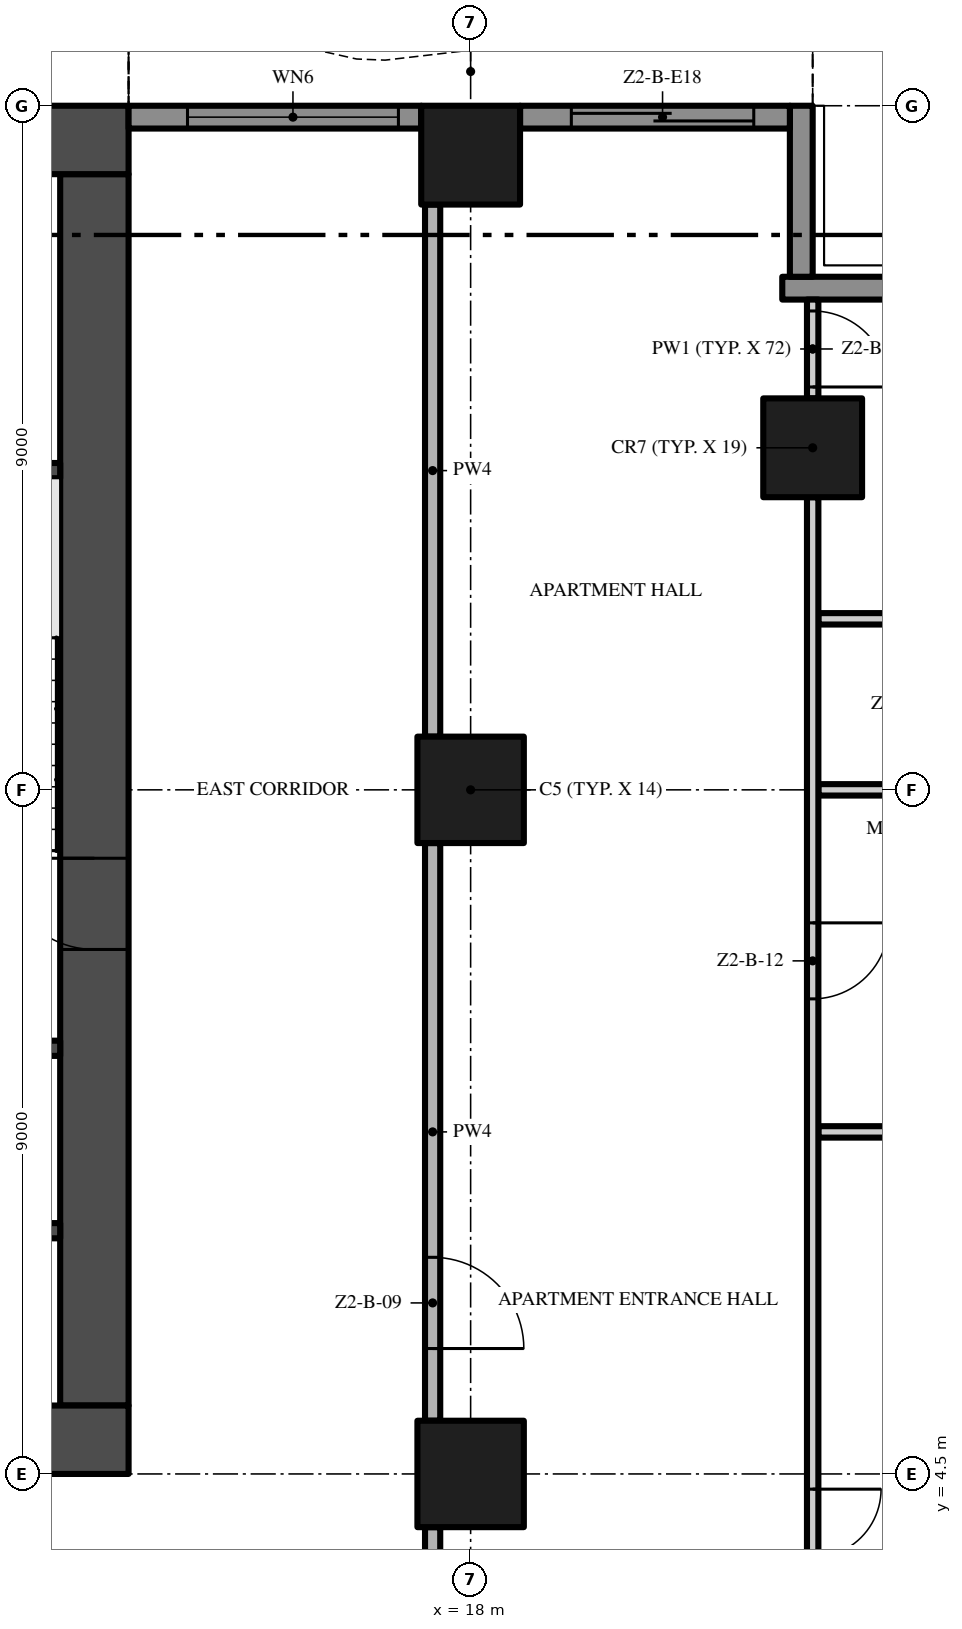
"""IFC4 building model, lengths in metres.
Left out: names, types, materials, properties, quantities, classifications, styles, units other than length and angle.
Written with IfcOpenShell. Run it as: python <this file> out.ifc"""

import sys

from ifc_helpers import new_model, si_unit, direction, frame, frame_2d, origin, origin_2d, place, context, subcontext, project, spatial, polyline, rectangle, outline, extrude, element, fill, save


model = new_model("IFC4")
c1 = context("Model", 3, precision=1e-05, world=origin(), true_north=direction((0.0, 1.0)))
c2 = subcontext(c1, "Body", "Model", "MODEL_VIEW")
j1 = project(units=[si_unit("LENGTHUNIT", "METRE"), si_unit("PLANEANGLEUNIT", "RADIAN")], contexts=[c1])
p1 = place(None, origin())
s1 = spatial("IfcSite", under=j1, at=p1, CompositionType="ELEMENT")
p2 = place(p1, origin())
s2 = spatial("IfcBuilding", under=s1, at=p2, CompositionType="ELEMENT")
p3 = place(p2, frame((0.0, 0.0, 88.4)))
s3 = spatial("IfcBuildingStorey", under=s2, at=p3, CompositionType="ELEMENT", Elevation=88.4)
p4 = place(p3, frame((-13.5, 4.95, -0.3), z_axis=(0.0, 0.0, 1.0), x_axis=(1.0, 0.0, 0.0)))
e1 = element("IfcWall", 1, at=p4, inside=s3, PredefinedType="SHEAR", context=c2, shape_type="SweptSolid", body=[
    extrude(rectangle(XDim=27.0, YDim=0.9, at=frame_2d((13.5, 0.0))), origin(), (0.0, 0.0, 1.0), 3.8),
])
p5 = place(p4, frame((12.0, 0.0, 0.3)))
e2 = element("IfcOpeningElement", 2, at=p5, cuts=e1, PredefinedType="OPENING", context=c2, shape_type="SweptSolid", body=[
    extrude(rectangle(XDim=3.0, YDim=2.4, at=frame_2d((1.5, 1.2))), frame((0.0, 0.46, 0.0), z_axis=(0.0, -1.0, 0.0), x_axis=(1.0, 0.0, 0.0)), (0.0, 0.0, 1.0), 0.92),
])
p6 = place(p4, frame((4.9, 0.0, 0.3)))
e3 = element("IfcOpeningElement", 3, at=p6, cuts=e1, PredefinedType="OPENING", context=c2, shape_type="SweptSolid", body=[
    extrude(rectangle(XDim=1.2, YDim=2.2, at=frame_2d((0.6, 1.1))), frame((0.0, 0.46, 0.0), z_axis=(0.0, -1.0, 0.0), x_axis=(1.0, 0.0, 0.0)), (0.0, 0.0, 1.0), 0.92),
])
p7 = place(p4, frame((20.75, 0.0, 0.3)))
e4 = element("IfcOpeningElement", 4, at=p7, cuts=e1, PredefinedType="OPENING", context=c2, shape_type="SweptSolid", body=[
    extrude(rectangle(XDim=1.5, YDim=2.2, at=frame_2d((0.75, 1.1))), frame((0.0, 0.46, 0.0), z_axis=(0.0, -1.0, 0.0), x_axis=(1.0, 0.0, 0.0)), (0.0, 0.0, 1.0), 0.92),
])
p8 = place(p4, frame((17.4, 0.0, 0.3)))
e5 = element("IfcOpeningElement", 5, at=p8, cuts=e1, PredefinedType="OPENING", context=c2, shape_type="SweptSolid", body=[
    extrude(rectangle(XDim=1.2, YDim=2.2, at=frame_2d((0.6, 1.1))), frame((0.0, 0.46, 0.0), z_axis=(0.0, -1.0, 0.0), x_axis=(1.0, 0.0, 0.0)), (0.0, 0.0, 1.0), 0.92),
])
p9 = place(p3, frame((13.05, 5.4, -0.3), z_axis=(0.0, 0.0, 1.0), x_axis=(0.0, 1.0, 0.0)))
e6 = element("IfcWall", 6, at=p9, inside=s3, PredefinedType="SHEAR", context=c2, shape_type="SweptSolid", body=[
    extrude(rectangle(XDim=16.2, YDim=0.9, at=frame_2d((8.1, 0.0))), origin(), (0.0, 0.0, 1.0), 3.8),
])
p10 = place(p9, frame((6.0, 0.0, 0.3)))
e7 = element("IfcOpeningElement", 7, at=p10, cuts=e6, PredefinedType="OPENING", context=c2, shape_type="SweptSolid", body=[
    extrude(rectangle(XDim=1.2, YDim=2.2, at=frame_2d((0.6, 1.1))), frame((0.0, 0.46, 0.0), z_axis=(0.0, -1.0, 0.0), x_axis=(1.0, 0.0, 0.0)), (0.0, 0.0, 1.0), 0.92),
])
p11 = place(p3, frame((13.5, 22.05, -0.3), z_axis=(0.0, 0.0, 1.0), x_axis=(-1.0, 0.0, 0.0)))
e8 = element("IfcWall", 8, at=p11, inside=s3, PredefinedType="SHEAR", context=c2, shape_type="SweptSolid", body=[
    extrude(rectangle(XDim=27.0, YDim=0.9, at=frame_2d((13.5, 0.0))), origin(), (0.0, 0.0, 1.0), 3.8),
])
p12 = place(p3, frame((18.0, 13.5, 0.0), z_axis=(0.0, 0.0, 1.0), x_axis=(1.0, 0.0, 0.0)))
e9 = element("IfcColumn", 9, at=p12, inside=s3, PredefinedType="COLUMN", context=c2, shape_type="SweptSolid", body=[
    extrude(rectangle(XDim=1.4, YDim=1.4, at=origin_2d()), origin(), (0.0, 0.0, 1.0), 3.5),
])
p13 = place(p3, frame((18.0, 21.85, 0.0), z_axis=(0.0, 0.0, 1.0), x_axis=(1.0, 0.0, 0.0)))
e10 = element("IfcColumn", 10, at=p13, inside=s3, PredefinedType="COLUMN", context=c2, shape_type="SweptSolid", body=[
    extrude(rectangle(XDim=1.3, YDim=1.3, at=origin_2d()), origin(), (0.0, 0.0, 1.0), 3.5),
])
p14 = place(p3, frame((18.0, 4.5, 0.0), z_axis=(0.0, 0.0, 1.0), x_axis=(1.0, 0.0, 0.0)))
e11 = element("IfcColumn", 11, at=p14, inside=s3, PredefinedType="COLUMN", context=c2, shape_type="SweptSolid", body=[
    extrude(rectangle(XDim=1.4, YDim=1.4, at=origin_2d()), origin(), (0.0, 0.0, 1.0), 3.5),
])
p15 = place(p3, frame((22.5, 18.0, 0.0), z_axis=(0.0, 0.0, 1.0), x_axis=(1.0, 0.0, 0.0)))
e12 = element("IfcColumn", 12, at=p15, inside=s3, PredefinedType="COLUMN", context=c2, shape_type="SweptSolid", body=[
    extrude(rectangle(XDim=1.3, YDim=1.3, at=origin_2d()), origin(), (0.0, 0.0, 1.0), 3.5),
])
p16 = place(p3, frame((22.1, 20.1, 0.0), z_axis=(0.0, 0.0, 1.0), x_axis=(1.0, 0.0, 0.0)))
e13 = element("IfcWall", 13, at=p16, inside=s3, PredefinedType="SOLIDWALL", context=c2, shape_type="SweptSolid", body=[
    extrude(rectangle(XDim=2.35, YDim=0.3, at=frame_2d((1.175, 0.0))), origin(), (0.0, 0.0, 1.0), 3.5),
])
p17 = place(p3, frame((22.35, 22.5, 0.0), z_axis=(0.0, 0.0, 1.0), x_axis=(0.0, -1.0, 0.0)))
e14 = element("IfcWall", 14, at=p17, inside=s3, PredefinedType="SOLIDWALL", context=c2, shape_type="SweptSolid", body=[
    extrude(rectangle(XDim=2.25, YDim=0.3, at=frame_2d((1.125, 0.0))), origin(), (0.0, 0.0, 1.0), 3.5),
])
p18 = place(p3, frame((18.65, 22.35, 0.0), z_axis=(0.0, 0.0, 1.0), x_axis=(1.0, 0.0, 0.0)))
e15 = element("IfcWall", 15, at=p18, inside=s3, PredefinedType="SOLIDWALL", context=c2, shape_type="SweptSolid", body=[
    extrude(rectangle(XDim=3.55, YDim=0.3, at=frame_2d((1.775, 0.0))), origin(), (0.0, 0.0, 1.0), 3.5),
])
p19 = place(p18, frame((0.675, 0.0, 0.0)))
e16 = element("IfcOpeningElement", 16, at=p19, cuts=e15, PredefinedType="OPENING", context=c2, shape_type="SweptSolid", body=[
    extrude(rectangle(XDim=2.4, YDim=2.4, at=frame_2d((1.2, 1.2))), frame((0.0, 0.16, 0.0), z_axis=(0.0, -1.0, 0.0), x_axis=(1.0, 0.0, 0.0)), (0.0, 0.0, 1.0), 0.32),
])
p20 = place(p3, frame((13.5, 22.35, 0.0), z_axis=(0.0, 0.0, 1.0), x_axis=(1.0, 0.0, 0.0)))
e17 = element("IfcWall", 17, at=p20, inside=s3, PredefinedType="SOLIDWALL", context=c2, shape_type="SweptSolid", body=[
    extrude(rectangle(XDim=3.85, YDim=0.3, at=frame_2d((1.925, 0.0))), origin(), (0.0, 0.0, 1.0), 3.5),
])
p21 = place(p20, frame((0.775, 0.0, 0.45)))
e18 = element("IfcOpeningElement", 18, at=p21, cuts=e17, PredefinedType="OPENING", context=c2, shape_type="SweptSolid", body=[
    extrude(rectangle(XDim=2.775, YDim=2.65, at=frame_2d((1.387, 1.325))), frame((0.0, 0.16, 0.0), z_axis=(0.0, -1.0, 0.0), x_axis=(1.0, 0.0, 0.0)), (0.0, 0.0, 1.0), 0.32),
])
p22 = place(p3, origin())
e19 = element("IfcWall", 19, at=p22, inside=s3, PredefinedType="USERDEFINED", context=c2, shape_type="SweptSolid", body=[
    extrude(outline(polyline([(22.5, 25.149), (21.0, 24.488), (19.5, 23.755), (18.0, 23.231), (16.875, 23.1), (16.5, 23.115), (15.0, 23.451), (13.5, 24.112), (13.399, 23.883), (14.921, 23.213), (16.467, 22.866), (16.885, 22.849), (18.056, 22.986), (19.596, 23.524), (21.105, 24.261), (22.601, 24.92), (22.5, 25.149)])), origin(), (0.0, 0.0, 1.0), 0.9),
])
for number, where, z_axis, x_axis in (
    (20, (9.65, 7.7, 0.0), (0.0, 0.0, 1.0), (1.0, 0.0, 0.0)),
    (21, (9.65, 10.1, 0.0), (0.0, 0.0, 1.0), (1.0, 0.0, 0.0)),
    (22, (9.65, 17.7, 0.0), (0.0, 0.0, 1.0), (1.0, 0.0, 0.0)),
):
    element("IfcWall", number, at=place(p3, frame(where, z_axis=z_axis, x_axis=x_axis)), inside=s3, PredefinedType="SHEAR", context=c2, shape_type="SweptSolid", body=[
        extrude(rectangle(XDim=2.95, YDim=0.2, at=frame_2d((1.475, 0.0))), origin(), (0.0, 0.0, 1.0), 3.5),
    ])
p23 = place(p3, frame((22.575, 9.0, 0.0), z_axis=(0.0, 0.0, 1.0), x_axis=(1.0, 0.0, 0.0)))
e23 = element("IfcWall", 23, at=p23, inside=s3, PredefinedType="PARTITIONING", context=c2, shape_type="SweptSolid", body=[
    extrude(rectangle(XDim=4.125, YDim=0.15, at=frame_2d((2.062, 0.0))), origin(), (0.0, 0.0, 1.0), 3.5),
])
p24 = place(p3, frame((22.575, 13.5, 0.0), z_axis=(0.0, 0.0, 1.0), x_axis=(1.0, 0.0, 0.0)))
e24 = element("IfcWall", 24, at=p24, inside=s3, PredefinedType="PARTITIONING", context=c2, shape_type="SweptSolid", body=[
    extrude(rectangle(XDim=3.125, YDim=0.15, at=frame_2d((1.562, 0.0))), origin(), (0.0, 0.0, 1.0), 3.5),
])
p25 = place(p3, frame((22.575, 15.75, 0.0), z_axis=(0.0, 0.0, 1.0), x_axis=(1.0, 0.0, 0.0)))
e25 = element("IfcWall", 25, at=p25, inside=s3, PredefinedType="PARTITIONING", context=c2, shape_type="SweptSolid", body=[
    extrude(rectangle(XDim=1.875, YDim=0.15, at=frame_2d((0.938, 0.0))), origin(), (0.0, 0.0, 1.0), 3.5),
])
p26 = place(p3, frame((17.5, -0.2, 0.0), z_axis=(0.0, 0.0, 1.0), x_axis=(0.0, 1.0, 0.0)))
e26 = element("IfcWall", 26, at=p26, inside=s3, PredefinedType="PARTITIONING", context=c2, shape_type="SweptSolid", body=[
    extrude(rectangle(XDim=4.0, YDim=0.2, at=frame_2d((2.0, 0.0))), origin(), (0.0, 0.0, 1.0), 3.5),
])
p27 = place(p3, frame((17.5, 12.8, 0.0), z_axis=(0.0, 0.0, 1.0), x_axis=(0.0, -1.0, 0.0)))
e27 = element("IfcWall", 27, at=p27, inside=s3, PredefinedType="PARTITIONING", context=c2, shape_type="SweptSolid", body=[
    extrude(rectangle(XDim=7.6, YDim=0.2, at=frame_2d((3.8, 0.0))), origin(), (0.0, 0.0, 1.0), 3.5),
])
p28 = place(p27, frame((5.45, 0.0, 0.0)))
e28 = element("IfcOpeningElement", 28, at=p28, cuts=e27, PredefinedType="OPENING", context=c2, shape_type="SweptSolid", body=[
    extrude(rectangle(XDim=1.2, YDim=2.4, at=frame_2d((0.6, 1.2))), frame((0.0, 0.11, 0.0), z_axis=(0.0, -1.0, 0.0), x_axis=(1.0, 0.0, 0.0)), (0.0, 0.0, 1.0), 0.22),
])
p29 = place(p3, frame((17.5, 14.2, 0.0), z_axis=(0.0, 0.0, 1.0), x_axis=(0.0, 1.0, 0.0)))
e29 = element("IfcWall", 29, at=p29, inside=s3, PredefinedType="PARTITIONING", context=c2, shape_type="SweptSolid", body=[
    extrude(rectangle(XDim=7.0, YDim=0.2, at=frame_2d((3.5, 0.0))), origin(), (0.0, 0.0, 1.0), 3.5),
])
p30 = place(p3, frame((22.5, 17.35, 0.0), z_axis=(0.0, 0.0, 1.0), x_axis=(0.0, -1.0, 0.0)))
e30 = element("IfcWall", 30, at=p30, inside=s3, PredefinedType="PARTITIONING", context=c2, shape_type="SweptSolid", body=[
    extrude(rectangle(XDim=17.25, YDim=0.15, at=frame_2d((8.625, 0.0))), origin(), (0.0, 0.0, 1.0), 3.5),
])
p31 = place(p30, frame((13.05, 0.0, 0.0)))
e31 = element("IfcOpeningElement", 31, at=p31, cuts=e30, PredefinedType="OPENING", context=c2, shape_type="SweptSolid", body=[
    extrude(rectangle(XDim=1.8, YDim=2.4, at=frame_2d((0.9, 1.2))), frame((0.0, 0.085, 0.0), z_axis=(0.0, -1.0, 0.0), x_axis=(1.0, 0.0, 0.0)), (0.0, 0.0, 1.0), 0.17),
])
p32 = place(p30, frame((5.6, 0.0, 0.0)))
e32 = element("IfcOpeningElement", 32, at=p32, cuts=e30, PredefinedType="OPENING", context=c2, shape_type="SweptSolid", body=[
    extrude(rectangle(XDim=1.0, YDim=2.4, at=frame_2d((0.5, 1.2))), frame((0.0, 0.085, 0.0), z_axis=(0.0, -1.0, 0.0), x_axis=(1.0, 0.0, 0.0)), (0.0, 0.0, 1.0), 0.17),
])
p33 = place(p3, frame((22.5, 19.95, 0.0), z_axis=(0.0, 0.0, 1.0), x_axis=(0.0, -1.0, 0.0)))
e33 = element("IfcWall", 33, at=p33, inside=s3, PredefinedType="PARTITIONING", context=c2, shape_type="SweptSolid", body=[
    extrude(rectangle(XDim=1.3, YDim=0.15, at=frame_2d((0.65, 0.0))), origin(), (0.0, 0.0, 1.0), 3.5),
])
p34 = place(p33, frame((0.15, 0.0, 0.0)))
e34 = element("IfcOpeningElement", 34, at=p34, cuts=e33, PredefinedType="OPENING", context=c2, shape_type="SweptSolid", body=[
    extrude(rectangle(XDim=1.0, YDim=2.4, at=frame_2d((0.5, 1.2))), frame((0.0, 0.085, 0.0), z_axis=(0.0, -1.0, 0.0), x_axis=(1.0, 0.0, 0.0)), (0.0, 0.0, 1.0), 0.17),
])
p35 = place(p19, origin())
e35 = element("IfcDoor", 35, at=p35, inside=s3, OperationType="SINGLE_SWING_LEFT", PredefinedType="DOOR", context=c2, shape_type="SweptSolid", body=[
    extrude(rectangle(XDim=2.4, YDim=2.4, at=frame_2d((1.2, 1.2))), frame((0.0, 0.025, 0.0), z_axis=(0.0, -1.0, 0.0), x_axis=(1.0, 0.0, 0.0)), (0.0, 0.0, 1.0), 0.05),
])
fill(e16, e35)
p36 = place(p21, origin())
e36 = element("IfcWindow", 36, at=p36, inside=s3, PartitioningType="SINGLE_PANEL", PredefinedType="WINDOW", context=c2, shape_type="SweptSolid", body=[
    extrude(rectangle(XDim=2.775, YDim=2.65, at=frame_2d((1.387, 1.325))), frame((0.0, 0.03, 0.0), z_axis=(0.0, -1.0, 0.0), x_axis=(1.0, 0.0, 0.0)), (0.0, 0.0, 1.0), 0.06),
])
fill(e18, e36)
p37 = place(p10, frame((1.2, 0.0, 0.0), z_axis=(0.0, 0.0, 1.0), x_axis=(-1.0, 0.0, 0.0)))
e37 = element("IfcDoor", 37, at=p37, inside=s3, OperationType="SINGLE_SWING_LEFT", PredefinedType="DOOR", context=c2, shape_type="SweptSolid", body=[
    extrude(rectangle(XDim=1.2, YDim=2.2, at=frame_2d((0.6, 1.1))), frame((0.0, 0.025, 0.0), z_axis=(0.0, -1.0, 0.0), x_axis=(1.0, 0.0, 0.0)), (0.0, 0.0, 1.0), 0.05),
])
fill(e7, e37)
p38 = place(p28, origin())
e38 = element("IfcDoor", 38, at=p38, inside=s3, OperationType="SINGLE_SWING_RIGHT", PredefinedType="DOOR", context=c2, shape_type="SweptSolid", body=[
    extrude(rectangle(XDim=1.2, YDim=2.4, at=frame_2d((0.6, 1.2))), frame((0.0, 0.025, 0.0), z_axis=(0.0, -1.0, 0.0), x_axis=(1.0, 0.0, 0.0)), (0.0, 0.0, 1.0), 0.05),
])
fill(e28, e38)
p39 = place(p31, origin())
e39 = element("IfcDoor", 39, at=p39, inside=s3, OperationType="DOUBLE_DOOR_SINGLE_SWING", PredefinedType="DOOR", context=c2, shape_type="SweptSolid", body=[
    extrude(rectangle(XDim=1.8, YDim=2.4, at=frame_2d((0.9, 1.2))), frame((0.0, 0.025, 0.0), z_axis=(0.0, -1.0, 0.0), x_axis=(1.0, 0.0, 0.0)), (0.0, 0.0, 1.0), 0.05),
])
fill(e31, e39)
p40 = place(p32, origin())
e40 = element("IfcDoor", 40, at=p40, inside=s3, OperationType="SINGLE_SWING_LEFT", PredefinedType="DOOR", context=c2, shape_type="SweptSolid", body=[
    extrude(rectangle(XDim=1.0, YDim=2.4, at=frame_2d((0.5, 1.2))), frame((0.0, 0.025, 0.0), z_axis=(0.0, -1.0, 0.0), x_axis=(1.0, 0.0, 0.0)), (0.0, 0.0, 1.0), 0.05),
])
fill(e32, e40)
p41 = place(p34, origin())
e41 = element("IfcDoor", 41, at=p41, inside=s3, OperationType="SINGLE_SWING_RIGHT", PredefinedType="DOOR", context=c2, shape_type="SweptSolid", body=[
    extrude(rectangle(XDim=1.0, YDim=2.4, at=frame_2d((0.5, 1.2))), frame((0.0, 0.025, 0.0), z_axis=(0.0, -1.0, 0.0), x_axis=(1.0, 0.0, 0.0)), (0.0, 0.0, 1.0), 0.05),
])
fill(e34, e41)
save(model, sys.argv[1])
